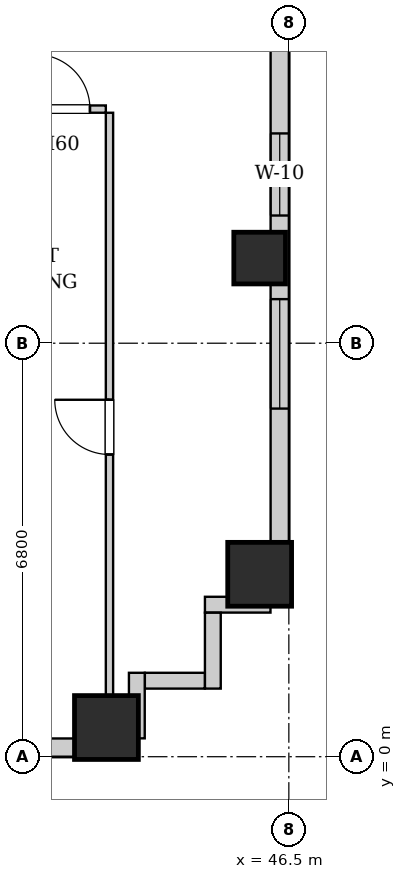
"""IFC4 building model, lengths in metres.
Left out: names, types, materials, properties, quantities, classifications, styles, units other than length and angle.
Written with IfcOpenShell. Run it as: python <this file> out.ifc"""

import sys

from ifc_helpers import new_model, si_unit, direction, frame, frame_2d, origin, origin_2d, place, context, subcontext, project, spatial, rectangle, extrude, element, fill, save


model = new_model("IFC4")
c1 = context("Model", 3, precision=1e-05, world=origin(), true_north=direction((0.0, 1.0)))
c2 = subcontext(c1, "Body", "Model", "MODEL_VIEW")
j1 = project(units=[si_unit("LENGTHUNIT", "METRE"), si_unit("PLANEANGLEUNIT", "RADIAN")], contexts=[c1])
p1 = place(None, origin())
s1 = spatial("IfcSite", under=j1, at=p1, CompositionType="ELEMENT")
p2 = place(p1, origin())
s2 = spatial("IfcBuilding", under=s1, at=p2, CompositionType="ELEMENT")
p3 = place(p2, frame((0.0, 0.0, 57.8)))
s3 = spatial("IfcBuildingStorey", under=s2, at=p3, CompositionType="ELEMENT", Elevation=57.8)
for number, where, z_axis, x_axis in (
    (1, (43.5, 0.48, 0.0), (0.0, 0.0, 1.0), (1.0, 0.0, 0.0)),
    (2, (46.02, 3.0, 0.0), (0.0, 0.0, 1.0), (1.0, 0.0, 0.0)),
):
    element("IfcColumn", number, at=place(p3, frame(where, z_axis=z_axis, x_axis=x_axis)), inside=s3, PredefinedType="COLUMN", context=c2, shape_type="SweptSolid", body=[
        extrude(rectangle(XDim=1.05, YDim=1.05, at=origin_2d()), origin(), (0.0, 0.0, 1.0), 3.2),
    ])
p4 = place(p3, frame((46.02, 8.2, 0.0), z_axis=(0.0, 0.0, 1.0), x_axis=(1.0, 0.0, 0.0)))
e3 = element("IfcColumn", 3, at=p4, inside=s3, PredefinedType="COLUMN", context=c2, shape_type="SweptSolid", body=[
    extrude(rectangle(XDim=0.85, YDim=0.85, at=origin_2d()), origin(), (0.0, 0.0, 1.0), 3.2),
])
p5 = place(p3, frame((46.35, 45.1, 0.0), z_axis=(0.0, 0.0, 1.0), x_axis=(0.0, -1.0, 0.0)))
e4 = element("IfcWall", 4, at=p5, inside=s3, PredefinedType="SOLIDWALL", context=c2, shape_type="SweptSolid", body=[
    extrude(rectangle(XDim=42.6, YDim=0.3, at=frame_2d((21.3, 0.0))), origin(), (0.0, 0.0, 1.0), 1.975),
])
p6 = place(p5, frame((37.575, 0.0, 0.55)))
e5 = element("IfcOpeningElement", 5, at=p6, cuts=e4, PredefinedType="OPENING", context=c2, shape_type="SweptSolid", body=[
    extrude(rectangle(XDim=1.8, YDim=1.2, at=frame_2d((0.9, 0.6))), frame((0.0, 0.16, 0.0), z_axis=(0.0, -1.0, 0.0), x_axis=(1.0, 0.0, 0.0)), (0.0, 0.0, 1.0), 0.32),
])
p7 = place(p5, frame((34.85, 0.0, 0.55)))
e6 = element("IfcOpeningElement", 6, at=p7, cuts=e4, PredefinedType="OPENING", context=c2, shape_type="SweptSolid", body=[
    extrude(rectangle(XDim=1.35, YDim=1.2, at=frame_2d((0.675, 0.6))), frame((0.0, 0.16, 0.0), z_axis=(0.0, -1.0, 0.0), x_axis=(1.0, 0.0, 0.0)), (0.0, 0.0, 1.0), 0.32),
])
p8 = place(p5, frame((3.715, 0.0, 0.55)))
e7 = element("IfcOpeningElement", 7, at=p8, cuts=e4, PredefinedType="OPENING", context=c2, shape_type="SweptSolid", body=[
    extrude(rectangle(XDim=1.8, YDim=1.2, at=frame_2d((0.9, 0.6))), frame((0.0, 0.16, 0.0), z_axis=(0.0, -1.0, 0.0), x_axis=(1.0, 0.0, 0.0)), (0.0, 0.0, 1.0), 0.32),
])
p9 = place(p5, frame((1.185, 0.0, 0.55)))
e8 = element("IfcOpeningElement", 8, at=p9, cuts=e4, PredefinedType="OPENING", context=c2, shape_type="SweptSolid", body=[
    extrude(rectangle(XDim=1.35, YDim=1.2, at=frame_2d((0.675, 0.6))), frame((0.0, 0.16, 0.0), z_axis=(0.0, -1.0, 0.0), x_axis=(1.0, 0.0, 0.0)), (0.0, 0.0, 1.0), 0.32),
])
p10 = place(p5, frame((26.025, 0.0, 0.55)))
e9 = element("IfcOpeningElement", 9, at=p10, cuts=e4, PredefinedType="OPENING", context=c2, shape_type="SweptSolid", body=[
    extrude(rectangle(XDim=1.8, YDim=1.2, at=frame_2d((0.9, 0.6))), frame((0.0, 0.16, 0.0), z_axis=(0.0, -1.0, 0.0), x_axis=(1.0, 0.0, 0.0)), (0.0, 0.0, 1.0), 0.32),
])
p11 = place(p5, frame((28.085, 0.0, 0.55)))
e10 = element("IfcOpeningElement", 10, at=p11, cuts=e4, PredefinedType="OPENING", context=c2, shape_type="SweptSolid", body=[
    extrude(rectangle(XDim=1.35, YDim=1.2, at=frame_2d((0.675, 0.6))), frame((0.0, 0.16, 0.0), z_axis=(0.0, -1.0, 0.0), x_axis=(1.0, 0.0, 0.0)), (0.0, 0.0, 1.0), 0.32),
])
p12 = place(p5, frame((18.8, 0.0, 0.55)))
e11 = element("IfcOpeningElement", 11, at=p12, cuts=e4, PredefinedType="OPENING", context=c2, shape_type="SweptSolid", body=[
    extrude(rectangle(XDim=1.8, YDim=1.2, at=frame_2d((0.9, 0.6))), frame((0.0, 0.16, 0.0), z_axis=(0.0, -1.0, 0.0), x_axis=(1.0, 0.0, 0.0)), (0.0, 0.0, 1.0), 0.32),
])
p13 = place(p5, frame((16.685, 0.0, 0.55)))
e12 = element("IfcOpeningElement", 12, at=p13, cuts=e4, PredefinedType="OPENING", context=c2, shape_type="SweptSolid", body=[
    extrude(rectangle(XDim=1.35, YDim=1.2, at=frame_2d((0.675, 0.6))), frame((0.0, 0.16, 0.0), z_axis=(0.0, -1.0, 0.0), x_axis=(1.0, 0.0, 0.0)), (0.0, 0.0, 1.0), 0.32),
])
p14 = place(p3, frame((44.0, 0.15, 0.0), z_axis=(0.0, 0.0, 1.0), x_axis=(-1.0, 0.0, 0.0)))
e13 = element("IfcWall", 13, at=p14, inside=s3, PredefinedType="SOLIDWALL", context=c2, shape_type="SweptSolid", body=[
    extrude(rectangle(XDim=27.55, YDim=0.3, at=frame_2d((13.775, 0.0))), origin(), (0.0, 0.0, 1.0), 1.975),
])
p15 = place(p14, frame((23.64, 0.0, 0.55)))
e14 = element("IfcOpeningElement", 14, at=p15, cuts=e13, PredefinedType="OPENING", context=c2, shape_type="SweptSolid", body=[
    extrude(rectangle(XDim=1.8, YDim=1.2, at=frame_2d((0.9, 0.6))), frame((0.0, 0.16, 0.0), z_axis=(0.0, -1.0, 0.0), x_axis=(1.0, 0.0, 0.0)), (0.0, 0.0, 1.0), 0.32),
])
p16 = place(p14, frame((21.5, 0.0, 0.55)))
e15 = element("IfcOpeningElement", 15, at=p16, cuts=e13, PredefinedType="OPENING", context=c2, shape_type="SweptSolid", body=[
    extrude(rectangle(XDim=0.85, YDim=1.2, at=frame_2d((0.425, 0.6))), frame((0.0, 0.16, 0.0), z_axis=(0.0, -1.0, 0.0), x_axis=(1.0, 0.0, 0.0)), (0.0, 0.0, 1.0), 0.32),
])
p17 = place(p14, frame((15.65, 0.0, 0.55)))
e16 = element("IfcOpeningElement", 16, at=p17, cuts=e13, PredefinedType="OPENING", context=c2, shape_type="SweptSolid", body=[
    extrude(rectangle(XDim=0.85, YDim=1.2, at=frame_2d((0.425, 0.6))), frame((0.0, 0.16, 0.0), z_axis=(0.0, -1.0, 0.0), x_axis=(1.0, 0.0, 0.0)), (0.0, 0.0, 1.0), 0.32),
])
p18 = place(p14, frame((12.875, 0.0, 0.55)))
e17 = element("IfcOpeningElement", 17, at=p18, cuts=e13, PredefinedType="OPENING", context=c2, shape_type="SweptSolid", body=[
    extrude(rectangle(XDim=1.8, YDim=1.2, at=frame_2d((0.9, 0.6))), frame((0.0, 0.16, 0.0), z_axis=(0.0, -1.0, 0.0), x_axis=(1.0, 0.0, 0.0)), (0.0, 0.0, 1.0), 0.32),
])
p19 = place(p14, frame((9.365, 0.0, 0.55)))
e18 = element("IfcOpeningElement", 18, at=p19, cuts=e13, PredefinedType="OPENING", context=c2, shape_type="SweptSolid", body=[
    extrude(rectangle(XDim=0.85, YDim=1.2, at=frame_2d((0.425, 0.6))), frame((0.0, 0.16, 0.0), z_axis=(0.0, -1.0, 0.0), x_axis=(1.0, 0.0, 0.0)), (0.0, 0.0, 1.0), 0.32),
])
p20 = place(p14, frame((6.477, 0.0, 0.55)))
e19 = element("IfcOpeningElement", 19, at=p20, cuts=e13, PredefinedType="OPENING", context=c2, shape_type="SweptSolid", body=[
    extrude(rectangle(XDim=1.8, YDim=1.2, at=frame_2d((0.9, 0.6))), frame((0.0, 0.16, 0.0), z_axis=(0.0, -1.0, 0.0), x_axis=(1.0, 0.0, 0.0)), (0.0, 0.0, 1.0), 0.32),
])
p21 = place(p14, frame((2.186, 0.0, 0.55)))
e20 = element("IfcOpeningElement", 20, at=p21, cuts=e13, PredefinedType="OPENING", context=c2, shape_type="SweptSolid", body=[
    extrude(rectangle(XDim=1.8, YDim=1.2, at=frame_2d((0.9, 0.6))), frame((0.0, 0.16, 0.0), z_axis=(0.0, -1.0, 0.0), x_axis=(1.0, 0.0, 0.0)), (0.0, 0.0, 1.0), 0.32),
])
p22 = place(p3, frame((46.198, 2.5, 0.0), z_axis=(0.0, 0.0, 1.0), x_axis=(-1.0, 0.0, 0.0)))
e21 = element("IfcWall", 21, at=p22, inside=s3, PredefinedType="SOLIDWALL", context=c2, shape_type="SweptSolid", body=[
    extrude(rectangle(XDim=1.078, YDim=0.26, at=frame_2d((0.539, 0.0))), origin(), (0.0, 0.0, 1.0), 2.94),
])
p23 = place(p3, frame((45.25, 2.368, 0.0), z_axis=(0.0, 0.0, 1.0), x_axis=(0.0, -1.0, 0.0)))
e22 = element("IfcWall", 22, at=p23, inside=s3, PredefinedType="SOLIDWALL", context=c2, shape_type="SweptSolid", body=[
    extrude(rectangle(XDim=1.248, YDim=0.26, at=frame_2d((0.624, 0.0))), origin(), (0.0, 0.0, 1.0), 2.94),
])
p24 = place(p3, frame((45.118, 1.25, 0.0), z_axis=(0.0, 0.0, 1.0), x_axis=(-1.0, 0.0, 0.0)))
e23 = element("IfcWall", 23, at=p24, inside=s3, PredefinedType="SOLIDWALL", context=c2, shape_type="SweptSolid", body=[
    extrude(rectangle(XDim=0.986, YDim=0.26, at=frame_2d((0.493, 0.0))), origin(), (0.0, 0.0, 1.0), 2.94),
])
p25 = place(p3, frame((44.0, 1.38, 0.0), z_axis=(0.0, 0.0, 1.0), x_axis=(0.0, -1.0, 0.0)))
e24 = element("IfcWall", 24, at=p25, inside=s3, PredefinedType="SOLIDWALL", context=c2, shape_type="SweptSolid", body=[
    extrude(rectangle(XDim=1.078, YDim=0.26, at=frame_2d((0.539, 0.0))), origin(), (0.0, 0.0, 1.0), 2.94),
])
p26 = place(p3, frame((42.067, 10.65, 0.0), z_axis=(0.0, 0.0, 1.0), x_axis=(1.0, 0.0, 0.0)))
e25 = element("IfcWall", 25, at=p26, inside=s3, PredefinedType="PARTITIONING", context=c2, shape_type="SweptSolid", body=[
    extrude(rectangle(XDim=1.423, YDim=0.12, at=frame_2d((0.711, 0.0))), origin(), (0.0, 0.0, 1.0), 2.94),
])
p27 = place(p26, frame((0.262, 0.0, 0.0)))
e26 = element("IfcOpeningElement", 26, at=p27, cuts=e25, PredefinedType="OPENING", context=c2, shape_type="SweptSolid", body=[
    extrude(rectangle(XDim=0.9, YDim=2.05, at=frame_2d((0.45, 1.025))), frame((0.0, 0.07, 0.0), z_axis=(0.0, -1.0, 0.0), x_axis=(1.0, 0.0, 0.0)), (0.0, 0.0, 1.0), 0.14),
])
p28 = place(p3, frame((43.55, 0.28, 0.0), z_axis=(0.0, 0.0, 1.0), x_axis=(0.0, 1.0, 0.0)))
e27 = element("IfcWall", 27, at=p28, inside=s3, PredefinedType="PARTITIONING", context=c2, shape_type="SweptSolid", body=[
    extrude(rectangle(XDim=10.31, YDim=0.12, at=frame_2d((5.155, 0.0))), origin(), (0.0, 0.0, 1.0), 2.94),
])
p29 = place(p28, frame((4.69, 0.0, 0.0)))
e28 = element("IfcOpeningElement", 28, at=p29, cuts=e27, PredefinedType="OPENING", context=c2, shape_type="SweptSolid", body=[
    extrude(rectangle(XDim=0.9, YDim=2.05, at=frame_2d((0.45, 1.025))), frame((0.0, 0.07, 0.0), z_axis=(0.0, -1.0, 0.0), x_axis=(1.0, 0.0, 0.0)), (0.0, 0.0, 1.0), 0.14),
])
p30 = place(p27, origin())
e29 = element("IfcDoor", 29, at=p30, inside=s3, OperationType="SINGLE_SWING_LEFT", PredefinedType="DOOR", context=c2, shape_type="SweptSolid", body=[
    extrude(rectangle(XDim=0.9, YDim=2.05, at=frame_2d((0.45, 1.025))), frame((0.0, 0.025, 0.0), z_axis=(0.0, -1.0, 0.0), x_axis=(1.0, 0.0, 0.0)), (0.0, 0.0, 1.0), 0.05),
])
fill(e26, e29)
p31 = place(p29, origin())
e30 = element("IfcDoor", 30, at=p31, inside=s3, OperationType="SINGLE_SWING_RIGHT", PredefinedType="DOOR", context=c2, shape_type="SweptSolid", body=[
    extrude(rectangle(XDim=0.9, YDim=2.05, at=frame_2d((0.45, 1.025))), frame((0.0, 0.025, 0.0), z_axis=(0.0, -1.0, 0.0), x_axis=(1.0, 0.0, 0.0)), (0.0, 0.0, 1.0), 0.05),
])
fill(e28, e30)
p32 = place(p6, origin())
e31 = element("IfcWindow", 31, at=p32, inside=s3, PartitioningType="DOUBLE_PANEL_VERTICAL", PredefinedType="WINDOW", context=c2, shape_type="SweptSolid", body=[
    extrude(rectangle(XDim=1.8, YDim=1.2, at=frame_2d((0.9, 0.6))), frame((0.0, 0.03, 0.0), z_axis=(0.0, -1.0, 0.0), x_axis=(1.0, 0.0, 0.0)), (0.0, 0.0, 1.0), 0.06),
])
fill(e5, e31)
p33 = place(p7, origin())
e32 = element("IfcWindow", 32, at=p33, inside=s3, PartitioningType="SINGLE_PANEL", PredefinedType="WINDOW", context=c2, shape_type="SweptSolid", body=[
    extrude(rectangle(XDim=1.35, YDim=1.2, at=frame_2d((0.675, 0.6))), frame((0.0, 0.03, 0.0), z_axis=(0.0, -1.0, 0.0), x_axis=(1.0, 0.0, 0.0)), (0.0, 0.0, 1.0), 0.06),
])
fill(e6, e32)
save(model, sys.argv[1])
